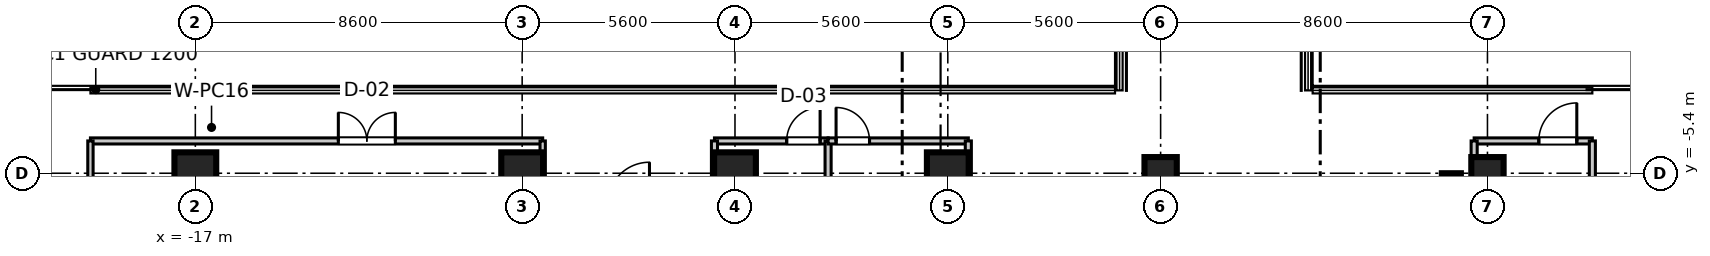
"""IFC4 building model, lengths in metres.
Left out: names, types, materials, properties, quantities, classifications, styles, units other than length and angle.
Written with IfcOpenShell. Run it as: python <this file> out.ifc"""

import sys

from ifc_helpers import new_model, si_unit, direction, frame, frame_2d, origin, origin_2d, place, context, subcontext, project, spatial, rectangle, extrude, source, transform, mapped, element, fill, save


model = new_model("IFC4")
c1 = context("Model", 3, precision=1e-05, world=origin(), true_north=direction((0.0, 1.0)))
c2 = subcontext(c1, "Body", "Model", "MODEL_VIEW")
j1 = project(units=[si_unit("LENGTHUNIT", "METRE"), si_unit("PLANEANGLEUNIT", "RADIAN")], contexts=[c1])
p1 = place(None, origin())
s1 = spatial("IfcSite", under=j1, at=p1, CompositionType="ELEMENT")
p2 = place(p1, origin())
s2 = spatial("IfcBuilding", under=s1, at=p2, CompositionType="ELEMENT")
p3 = place(p2, frame((0.0, 0.0, 163.6)))
s3 = spatial("IfcBuildingStorey", under=s2, at=p3, CompositionType="ELEMENT", Elevation=163.6)
m1 = source(origin(), c2, "Body", "SweptSolid", [
    extrude(rectangle(XDim=1.1, YDim=1.1, at=origin_2d()), origin(), (0.0, 0.0, 1.0), 3.605),
])
for number, where, z_axis, x_axis in (
    (1, (-17.0, -5.4, 0.0), (0.0, 0.0, 1.0), (1.0, 0.0, 0.0)),
    (2, (-8.4, -5.4, 0.0), (0.0, 0.0, 1.0), (1.0, 0.0, 0.0)),
    (3, (-2.8, -5.4, 0.0), (0.0, 0.0, 1.0), (1.0, 0.0, 0.0)),
    (4, (2.8, -5.4, 0.0), (0.0, 0.0, 1.0), (1.0, 0.0, 0.0)),
):
    element("IfcColumn", number, at=place(p3, frame(where, z_axis=z_axis, x_axis=x_axis)), inside=s3, PredefinedType="COLUMN", context=c2, shape_type="MappedRepresentation", body=[
        mapped(m1, transform((0.0, 0.0, 0.0), scale=1.0)),
    ])
m2 = source(origin(), c2, "Body", "SweptSolid", [
    extrude(rectangle(XDim=0.85, YDim=0.85, at=origin_2d()), origin(), (0.0, 0.0, 1.0), 3.605),
])
for number, where, z_axis, x_axis in (
    (5, (8.4, -5.4, 0.0), (0.0, 0.0, 1.0), (1.0, 0.0, 0.0)),
    (6, (17.0, -5.4, 0.0), (0.0, 0.0, 1.0), (1.0, 0.0, 0.0)),
):
    element("IfcColumn", number, at=place(p3, frame(where, z_axis=z_axis, x_axis=x_axis)), inside=s3, PredefinedType="PILASTER", context=c2, shape_type="MappedRepresentation", body=[
        mapped(m2, transform((0.0, 0.0, 0.0), scale=1.0)),
    ])
m3 = source(origin(), c2, "Body", "SweptSolid", [
    extrude(rectangle(XDim=11.6, YDim=0.5, at=frame_2d((5.8, 0.0))), origin(), (0.0, 0.0, 1.0), 3.39),
])
p4 = place(p3, frame((16.05, -17.0, 0.0), z_axis=(0.0, 0.0, 1.0), x_axis=(0.0, 1.0, 0.0)))
e7 = element("IfcWall", 7, at=p4, inside=s3, PredefinedType="SHEAR", context=c2, shape_type="MappedRepresentation", body=[
    mapped(m3, transform((0.0, 0.0, 0.0), scale=1.0)),
])
m4 = source(origin(), c2, "Body", "SweptSolid", [
    extrude(rectangle(XDim=3.11, YDim=0.16, at=frame_2d((1.555, 0.0))), origin(), (0.0, 0.0, 1.0), 2.73),
])
p5 = place(p3, frame((16.65, -4.55, 0.0), z_axis=(0.0, 0.0, 1.0), x_axis=(1.0, 0.0, 0.0)))
e8 = element("IfcWall", 8, at=p5, inside=s3, PredefinedType="PARTITIONING", context=c2, shape_type="MappedRepresentation", body=[
    mapped(m4, transform((0.0, 0.0, 0.0), scale=1.0)),
])
p6 = place(p5, frame((1.701, 0.0, 0.0)))
e9 = element("IfcOpeningElement", 9, at=p6, cuts=e8, PredefinedType="OPENING", context=c2, shape_type="SweptSolid", body=[
    extrude(rectangle(XDim=1.0, YDim=2.1, at=frame_2d((0.5, 1.05))), frame((0.0, 0.09, 0.0), z_axis=(0.0, -1.0, 0.0), x_axis=(1.0, 0.0, 0.0)), (0.0, 0.0, 1.0), 0.18),
])
m5 = source(origin(), c2, "Body", "SweptSolid", [
    extrude(rectangle(XDim=17.95, YDim=0.16, at=frame_2d((8.975, 0.0))), origin(), (0.0, 0.0, 1.0), 2.73),
])
p7 = place(p3, frame((16.65, -22.5, 0.0), z_axis=(0.0, 0.0, 1.0), x_axis=(0.0, 1.0, 0.0)))
e10 = element("IfcWall", 10, at=p7, inside=s3, PredefinedType="PARTITIONING", context=c2, shape_type="MappedRepresentation", body=[
    mapped(m5, transform((0.0, 0.0, 0.0), scale=1.0)),
])
m6 = source(origin(), c2, "Body", "SweptSolid", [
    extrude(rectangle(XDim=16.53, YDim=0.16, at=frame_2d((8.265, 0.0))), origin(), (0.0, 0.0, 1.0), 2.73),
])
p8 = place(p3, frame((19.76, -21.08, 0.0), z_axis=(0.0, 0.0, 1.0), x_axis=(0.0, 1.0, 0.0)))
e11 = element("IfcWall", 11, at=p8, inside=s3, PredefinedType="PARTITIONING", context=c2, shape_type="MappedRepresentation", body=[
    mapped(m6, transform((0.0, 0.0, 0.0), scale=1.0)),
])
m7 = source(origin(), c2, "Body", "SweptSolid", [
    extrude(rectangle(XDim=11.9, YDim=0.16, at=frame_2d((5.95, 0.0))), origin(), (0.0, 0.0, 1.0), 2.73),
])
p9 = place(p3, frame((-19.76, -4.55, 0.0), z_axis=(0.0, 0.0, 1.0), x_axis=(1.0, 0.0, 0.0)))
e12 = element("IfcWall", 12, at=p9, inside=s3, PredefinedType="PARTITIONING", context=c2, shape_type="MappedRepresentation", body=[
    mapped(m7, transform((0.0, 0.0, 0.0), scale=1.0)),
])
p10 = place(p9, frame((6.523, 0.0, 0.0)))
e13 = element("IfcOpeningElement", 13, at=p10, cuts=e12, PredefinedType="OPENING", context=c2, shape_type="SweptSolid", body=[
    extrude(rectangle(XDim=1.5, YDim=2.15, at=frame_2d((0.75, 1.075))), frame((0.0, 0.09, 0.0), z_axis=(0.0, -1.0, 0.0), x_axis=(1.0, 0.0, 0.0)), (0.0, 0.0, 1.0), 0.18),
])
m8 = source(origin(), c2, "Body", "SweptSolid", [
    extrude(rectangle(XDim=16.53, YDim=0.14, at=frame_2d((8.265, 0.0))), origin(), (0.0, 0.0, 1.0), 2.73),
])
p11 = place(p3, frame((-19.76, -21.08, 0.0), z_axis=(0.0, 0.0, 1.0), x_axis=(0.0, 1.0, 0.0)))
e14 = element("IfcWall", 14, at=p11, inside=s3, PredefinedType="PARTITIONING", context=c2, shape_type="MappedRepresentation", body=[
    mapped(m8, transform((0.0, 0.0, 0.0), scale=1.0)),
])
m9 = source(origin(), c2, "Body", "SweptSolid", [
    extrude(rectangle(XDim=17.95, YDim=0.14, at=frame_2d((8.975, 0.0))), origin(), (0.0, 0.0, 1.0), 2.73),
])
p12 = place(p3, frame((-7.86, -22.5, 0.0), z_axis=(0.0, 0.0, 1.0), x_axis=(0.0, 1.0, 0.0)))
e15 = element("IfcWall", 15, at=p12, inside=s3, PredefinedType="PARTITIONING", context=c2, shape_type="MappedRepresentation", body=[
    mapped(m9, transform((0.0, 0.0, 0.0), scale=1.0)),
])
m10 = source(origin(), c2, "Body", "SweptSolid", [
    extrude(rectangle(XDim=2.99, YDim=0.16, at=frame_2d((1.495, 0.0))), origin(), (0.0, 0.0, 1.0), 2.73),
])
p13 = place(p3, frame((-3.34, -4.55, 0.0), z_axis=(0.0, 0.0, 1.0), x_axis=(1.0, 0.0, 0.0)))
e16 = element("IfcWall", 16, at=p13, inside=s3, PredefinedType="PARTITIONING", context=c2, shape_type="MappedRepresentation", body=[
    mapped(m10, transform((0.0, 0.0, 0.0), scale=1.0)),
])
p14 = place(p13, frame((1.9, 0.0, 0.0)))
e17 = element("IfcOpeningElement", 17, at=p14, cuts=e16, PredefinedType="OPENING", context=c2, shape_type="SweptSolid", body=[
    extrude(rectangle(XDim=0.88, YDim=2.1, at=frame_2d((0.44, 1.05))), frame((0.0, 0.09, 0.0), z_axis=(0.0, -1.0, 0.0), x_axis=(1.0, 0.0, 0.0)), (0.0, 0.0, 1.0), 0.18),
])
for number, where, z_axis, x_axis in (
    (18, (-3.34, -22.5, 0.0), (0.0, 0.0, 1.0), (0.0, 1.0, 0.0)),
    (19, (-0.35, -22.5, 0.0), (0.0, 0.0, 1.0), (0.0, 1.0, 0.0)),
):
    element("IfcWall", number, at=place(p3, frame(where, z_axis=z_axis, x_axis=x_axis)), inside=s3, PredefinedType="PARTITIONING", context=c2, shape_type="MappedRepresentation", body=[
        mapped(m5, transform((0.0, 0.0, 0.0), scale=1.0)),
    ])
m11 = source(origin(), c2, "Body", "SweptSolid", [
    extrude(rectangle(XDim=3.69, YDim=0.16, at=frame_2d((1.845, 0.0))), origin(), (0.0, 0.0, 1.0), 2.73),
])
p15 = place(p3, frame((-0.35, -4.55, 0.0), z_axis=(0.0, 0.0, 1.0), x_axis=(1.0, 0.0, 0.0)))
e20 = element("IfcWall", 20, at=p15, inside=s3, PredefinedType="PARTITIONING", context=c2, shape_type="MappedRepresentation", body=[
    mapped(m11, transform((0.0, 0.0, 0.0), scale=1.0)),
])
p16 = place(p15, frame((0.21, 0.0, 0.0)))
e21 = element("IfcOpeningElement", 21, at=p16, cuts=e20, PredefinedType="OPENING", context=c2, shape_type="SweptSolid", body=[
    extrude(rectangle(XDim=0.88, YDim=2.1, at=frame_2d((0.44, 1.05))), frame((0.0, 0.09, 0.0), z_axis=(0.0, -1.0, 0.0), x_axis=(1.0, 0.0, 0.0)), (0.0, 0.0, 1.0), 0.18),
])
p17 = place(p3, frame((3.34, -22.5, 0.0), z_axis=(0.0, 0.0, 1.0), x_axis=(0.0, 1.0, 0.0)))
e22 = element("IfcWall", 22, at=p17, inside=s3, PredefinedType="PARTITIONING", context=c2, shape_type="MappedRepresentation", body=[
    mapped(m5, transform((0.0, 0.0, 0.0), scale=1.0)),
])
m12 = source(origin(), c2, "Body", "SweptSolid", [
    extrude(rectangle(XDim=1.0, YDim=2.1, at=frame_2d((0.5, 1.05))), frame((0.0, 0.025, 0.0), z_axis=(0.0, -1.0, 0.0), x_axis=(1.0, 0.0, 0.0)), (0.0, 0.0, 1.0), 0.05),
])
p18 = place(p6, frame((1.0, 0.0, 0.0), z_axis=(0.0, 0.0, 1.0), x_axis=(-1.0, 0.0, 0.0)))
e23 = element("IfcDoor", 23, at=p18, inside=s3, OperationType="SINGLE_SWING_RIGHT", PredefinedType="DOOR", context=c2, shape_type="MappedRepresentation", body=[
    mapped(m12, transform((0.0, 0.0, 0.0), scale=1.0)),
])
fill(e9, e23)
m13 = source(origin(), c2, "Body", "SweptSolid", [
    extrude(rectangle(XDim=1.5, YDim=2.15, at=frame_2d((0.75, 1.075))), frame((0.0, 0.025, 0.0), z_axis=(0.0, -1.0, 0.0), x_axis=(1.0, 0.0, 0.0)), (0.0, 0.0, 1.0), 0.05),
])
p19 = place(p10, frame((1.5, 0.0, 0.0), z_axis=(0.0, 0.0, 1.0), x_axis=(-1.0, 0.0, 0.0)))
e24 = element("IfcDoor", 24, at=p19, inside=s3, OperationType="DOUBLE_DOOR_SINGLE_SWING", PredefinedType="DOOR", context=c2, shape_type="MappedRepresentation", body=[
    mapped(m13, transform((0.0, 0.0, 0.0), scale=1.0)),
])
fill(e13, e24)
m14 = source(origin(), c2, "Body", "SweptSolid", [
    extrude(rectangle(XDim=0.88, YDim=2.1, at=frame_2d((0.44, 1.05))), frame((0.0, 0.025, 0.0), z_axis=(0.0, -1.0, 0.0), x_axis=(1.0, 0.0, 0.0)), (0.0, 0.0, 1.0), 0.05),
])
p20 = place(p14, frame((0.88, 0.0, 0.0), z_axis=(0.0, 0.0, 1.0), x_axis=(-1.0, 0.0, 0.0)))
e25 = element("IfcDoor", 25, at=p20, inside=s3, OperationType="SINGLE_SWING_RIGHT", PredefinedType="DOOR", context=c2, shape_type="MappedRepresentation", body=[
    mapped(m14, transform((0.0, 0.0, 0.0), scale=1.0)),
])
fill(e17, e25)
p21 = place(p16, frame((0.88, 0.0, 0.0), z_axis=(0.0, 0.0, 1.0), x_axis=(-1.0, 0.0, 0.0)))
e26 = element("IfcDoor", 26, at=p21, inside=s3, OperationType="SINGLE_SWING_LEFT", PredefinedType="DOOR", context=c2, shape_type="MappedRepresentation", body=[
    mapped(m14, transform((0.0, 0.0, 0.0), scale=1.0)),
])
fill(e21, e26)
save(model, sys.argv[1])
